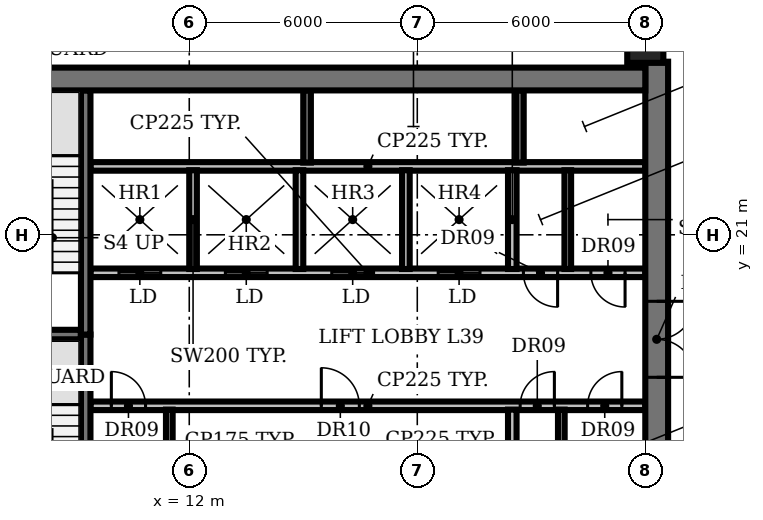
"""IFC4 building model, lengths in metres.
Left out: names, types, materials, properties, quantities, classifications, styles, units other than length and angle.
Written with IfcOpenShell. Run it as: python <this file> out.ifc"""

import sys

from ifc_helpers import new_model, si_unit, direction, frame, frame_2d, origin, origin_2d, place, context, subcontext, project, spatial, rectangle, circle, extrude, element, fill, save


model = new_model("IFC4")
c1 = context("Model", 3, precision=1e-05, world=origin(), true_north=direction((0.0, 1.0)))
c2 = subcontext(c1, "Body", "Model", "MODEL_VIEW")
j1 = project(units=[si_unit("LENGTHUNIT", "METRE"), si_unit("PLANEANGLEUNIT", "RADIAN")], contexts=[c1])
p1 = place(None, origin())
s1 = spatial("IfcSite", under=j1, at=p1, CompositionType="ELEMENT")
p2 = place(p1, origin())
s2 = spatial("IfcBuilding", under=s1, at=p2, CompositionType="ELEMENT")
p3 = place(p2, frame((0.0, 0.0, 176.0)))
s3 = spatial("IfcBuildingStorey", under=s2, at=p3, CompositionType="ELEMENT", Elevation=176.0)
p4 = place(p3, frame((24.0, 26.0, 0.0), z_axis=(0.0, 0.0, 1.0), x_axis=(1.0, 0.0, 0.0)))
e1 = element("IfcColumn", 1, at=p4, inside=s3, PredefinedType="COLUMN", context=c2, shape_type="SweptSolid", body=[
    extrude(circle(Radius=0.475, at=origin_2d()), origin(), (0.0, 0.0, 1.0), 3.85),
])
p5 = place(p3, frame((9.4, 16.5, 0.0), z_axis=(0.0, 0.0, 1.0), x_axis=(1.0, 0.0, 0.0)))
e2 = element("IfcWall", 2, at=p5, inside=s3, PredefinedType="PARTITIONING", context=c2, shape_type="SweptSolid", body=[
    extrude(rectangle(XDim=14.6, YDim=0.225, at=frame_2d((7.3, 0.0))), origin(), (0.0, 0.0, 1.0), 3.85),
])
p6 = place(p5, frame((0.55, 0.0, 0.0)))
e3 = element("IfcOpeningElement", 3, at=p6, cuts=e2, PredefinedType="OPENING", context=c2, shape_type="SweptSolid", body=[
    extrude(rectangle(XDim=0.9, YDim=2.1, at=frame_2d((0.45, 1.05))), frame((0.0, 0.123, 0.0), z_axis=(0.0, -1.0, 0.0), x_axis=(1.0, 0.0, 0.0)), (0.0, 0.0, 1.0), 0.245),
])
p7 = place(p5, frame((6.075, 0.0, 0.0)))
e4 = element("IfcOpeningElement", 4, at=p7, cuts=e2, PredefinedType="OPENING", context=c2, shape_type="SweptSolid", body=[
    extrude(rectangle(XDim=1.0, YDim=2.1, at=frame_2d((0.5, 1.05))), frame((0.0, 0.123, 0.0), z_axis=(0.0, -1.0, 0.0), x_axis=(1.0, 0.0, 0.0)), (0.0, 0.0, 1.0), 0.245),
])
p8 = place(p5, frame((11.308, 0.0, 0.0)))
e5 = element("IfcOpeningElement", 5, at=p8, cuts=e2, PredefinedType="OPENING", context=c2, shape_type="SweptSolid", body=[
    extrude(rectangle(XDim=0.9, YDim=2.1, at=frame_2d((0.45, 1.05))), frame((0.0, 0.123, 0.0), z_axis=(0.0, -1.0, 0.0), x_axis=(1.0, 0.0, 0.0)), (0.0, 0.0, 1.0), 0.245),
])
p9 = place(p5, frame((13.083, 0.0, 0.0)))
e6 = element("IfcOpeningElement", 6, at=p9, cuts=e2, PredefinedType="OPENING", context=c2, shape_type="SweptSolid", body=[
    extrude(rectangle(XDim=0.9, YDim=2.1, at=frame_2d((0.45, 1.05))), frame((0.0, 0.123, 0.0), z_axis=(0.0, -1.0, 0.0), x_axis=(1.0, 0.0, 0.0)), (0.0, 0.0, 1.0), 0.245),
])
p10 = place(p3, frame((6.0, 18.375, 0.0), z_axis=(0.0, 0.0, 1.0), x_axis=(1.0, 0.0, 0.0)))
e7 = element("IfcWall", 7, at=p10, inside=s3, PredefinedType="SHEAR", context=c2, shape_type="SweptSolid", body=[
    extrude(rectangle(XDim=3.15, YDim=0.25, at=frame_2d((1.575, 0.0))), origin(), (0.0, 0.0, 1.0), 3.85),
])
p11 = place(p3, frame((24.0, 20.0, 0.0), z_axis=(0.0, 0.0, 1.0), x_axis=(-1.0, 0.0, 0.0)))
e8 = element("IfcWall", 8, at=p11, inside=s3, PredefinedType="PARTITIONING", context=c2, shape_type="SweptSolid", body=[
    extrude(rectangle(XDim=14.6, YDim=0.225, at=frame_2d((7.3, 0.0))), origin(), (0.0, 0.0, 1.0), 3.85),
])
p12 = place(p11, frame((12.75, 0.0, 0.0)))
e9 = element("IfcOpeningElement", 9, at=p12, cuts=e8, PredefinedType="OPENING", context=c2, shape_type="SweptSolid", body=[
    extrude(rectangle(XDim=1.1, YDim=2.1, at=frame_2d((0.55, 1.05))), frame((0.0, 0.123, 0.0), z_axis=(0.0, -1.0, 0.0), x_axis=(1.0, 0.0, 0.0)), (0.0, 0.0, 1.0), 0.245),
])
p13 = place(p11, frame((9.95, 0.0, 0.0)))
e10 = element("IfcOpeningElement", 10, at=p13, cuts=e8, PredefinedType="OPENING", context=c2, shape_type="SweptSolid", body=[
    extrude(rectangle(XDim=1.1, YDim=2.1, at=frame_2d((0.55, 1.05))), frame((0.0, 0.123, 0.0), z_axis=(0.0, -1.0, 0.0), x_axis=(1.0, 0.0, 0.0)), (0.0, 0.0, 1.0), 0.245),
])
p14 = place(p11, frame((7.15, 0.0, 0.0)))
e11 = element("IfcOpeningElement", 11, at=p14, cuts=e8, PredefinedType="OPENING", context=c2, shape_type="SweptSolid", body=[
    extrude(rectangle(XDim=1.1, YDim=2.1, at=frame_2d((0.55, 1.05))), frame((0.0, 0.123, 0.0), z_axis=(0.0, -1.0, 0.0), x_axis=(1.0, 0.0, 0.0)), (0.0, 0.0, 1.0), 0.245),
])
p15 = place(p11, frame((4.35, 0.0, 0.0)))
e12 = element("IfcOpeningElement", 12, at=p15, cuts=e8, PredefinedType="OPENING", context=c2, shape_type="SweptSolid", body=[
    extrude(rectangle(XDim=1.1, YDim=2.1, at=frame_2d((0.55, 1.05))), frame((0.0, 0.123, 0.0), z_axis=(0.0, -1.0, 0.0), x_axis=(1.0, 0.0, 0.0)), (0.0, 0.0, 1.0), 0.245),
])
p16 = place(p11, frame((2.308, 0.0, 0.0)))
e13 = element("IfcOpeningElement", 13, at=p16, cuts=e8, PredefinedType="OPENING", context=c2, shape_type="SweptSolid", body=[
    extrude(rectangle(XDim=0.9, YDim=2.1, at=frame_2d((0.45, 1.05))), frame((0.0, 0.123, 0.0), z_axis=(0.0, -1.0, 0.0), x_axis=(1.0, 0.0, 0.0)), (0.0, 0.0, 1.0), 0.245),
])
p17 = place(p11, frame((0.532, 0.0, 0.0)))
e14 = element("IfcOpeningElement", 14, at=p17, cuts=e8, PredefinedType="OPENING", context=c2, shape_type="SweptSolid", body=[
    extrude(rectangle(XDim=0.9, YDim=2.1, at=frame_2d((0.45, 1.05))), frame((0.0, 0.123, 0.0), z_axis=(0.0, -1.0, 0.0), x_axis=(1.0, 0.0, 0.0)), (0.0, 0.0, 1.0), 0.245),
])
p18 = place(p3, frame((9.4, 22.8, 0.0), z_axis=(0.0, 0.0, 1.0), x_axis=(1.0, 0.0, 0.0)))
e15 = element("IfcWall", 15, at=p18, inside=s3, PredefinedType="PARTITIONING", context=c2, shape_type="SweptSolid", body=[
    extrude(rectangle(XDim=14.6, YDim=0.225, at=frame_2d((7.3, 0.0))), origin(), (0.0, 0.0, 1.0), 3.85),
])
p19 = place(p3, frame((9.275, 18.375, 0.0), z_axis=(0.0, 0.0, 1.0), x_axis=(0.0, -1.0, 0.0)))
e16 = element("IfcWall", 16, at=p19, inside=s3, PredefinedType="SHEAR", context=c2, shape_type="SweptSolid", body=[
    extrude(rectangle(XDim=6.55, YDim=0.25, at=frame_2d((3.275, 0.0))), origin(), (0.0, 0.0, 1.0), 3.85),
])
p20 = place(p19, frame((5.075, 0.0, 0.0)))
e17 = element("IfcOpeningElement", 17, at=p20, cuts=e16, PredefinedType="OPENING", context=c2, shape_type="SweptSolid", body=[
    extrude(rectangle(XDim=1.0, YDim=2.1, at=frame_2d((0.5, 1.05))), frame((0.0, 0.135, 0.0), z_axis=(0.0, -1.0, 0.0), x_axis=(1.0, 0.0, 0.0)), (0.0, 0.0, 1.0), 0.27),
])
p21 = place(p3, frame((9.275, 18.375, 0.0), z_axis=(0.0, 0.0, 1.0), x_axis=(0.0, 1.0, 0.0)))
e18 = element("IfcWall", 18, at=p21, inside=s3, PredefinedType="SHEAR", context=c2, shape_type="SweptSolid", body=[
    extrude(rectangle(XDim=6.425, YDim=0.25, at=frame_2d((3.212, 0.0))), origin(), (0.0, 0.0, 1.0), 3.85),
])
p22 = place(p3, frame((11.475, 13.8, 0.0), z_axis=(0.0, 0.0, 1.0), x_axis=(0.0, 1.0, 0.0)))
e19 = element("IfcWall", 19, at=p22, inside=s3, PredefinedType="PARTITIONING", context=c2, shape_type="SweptSolid", body=[
    extrude(rectangle(XDim=2.6, YDim=0.175, at=frame_2d((1.3, 0.0))), origin(), (0.0, 0.0, 1.0), 3.85),
])
for number, where, z_axis, x_axis in (
    (20, (12.1, 20.1, 0.0), (0.0, 0.0, 1.0), (0.0, 1.0, 0.0)),
    (21, (14.9, 20.1, 0.0), (0.0, 0.0, 1.0), (0.0, 1.0, 0.0)),
):
    element("IfcWall", number, at=place(p3, frame(where, z_axis=z_axis, x_axis=x_axis)), inside=s3, PredefinedType="SOLIDWALL", context=c2, shape_type="SweptSolid", body=[
        extrude(rectangle(XDim=2.6, YDim=0.2, at=frame_2d((1.3, 0.0))), origin(), (0.0, 0.0, 1.0), 3.85),
    ])
p23 = place(p3, frame((15.1, 22.9, 0.0), z_axis=(0.0, 0.0, 1.0), x_axis=(0.0, 1.0, 0.0)))
e22 = element("IfcWall", 22, at=p23, inside=s3, PredefinedType="SHEAR", context=c2, shape_type="SweptSolid", body=[
    extrude(rectangle(XDim=1.9, YDim=0.2, at=frame_2d((0.95, 0.0))), origin(), (0.0, 0.0, 1.0), 3.85),
])
p24 = place(p3, frame((17.7, 20.1, 0.0), z_axis=(0.0, 0.0, 1.0), x_axis=(0.0, 1.0, 0.0)))
e23 = element("IfcWall", 23, at=p24, inside=s3, PredefinedType="SOLIDWALL", context=c2, shape_type="SweptSolid", body=[
    extrude(rectangle(XDim=2.6, YDim=0.2, at=frame_2d((1.3, 0.0))), origin(), (0.0, 0.0, 1.0), 3.85),
])
for number, where, z_axis, x_axis in (
    (24, (20.5, 13.8, 0.0), (0.0, 0.0, 1.0), (0.0, 1.0, 0.0)),
    (25, (20.5, 20.1, 0.0), (0.0, 0.0, 1.0), (0.0, 1.0, 0.0)),
):
    element("IfcWall", number, at=place(p3, frame(where, z_axis=z_axis, x_axis=x_axis)), inside=s3, PredefinedType="PARTITIONING", context=c2, shape_type="SweptSolid", body=[
        extrude(rectangle(XDim=2.6, YDim=0.225, at=frame_2d((1.3, 0.0))), origin(), (0.0, 0.0, 1.0), 3.85),
    ])
p25 = place(p3, frame((20.7, 22.9, 0.0), z_axis=(0.0, 0.0, 1.0), x_axis=(0.0, 1.0, 0.0)))
e26 = element("IfcWall", 26, at=p25, inside=s3, PredefinedType="SHEAR", context=c2, shape_type="SweptSolid", body=[
    extrude(rectangle(XDim=1.9, YDim=0.2, at=frame_2d((0.95, 0.0))), origin(), (0.0, 0.0, 1.0), 3.85),
])
for number, where, z_axis, x_axis in (
    (27, (21.79, 13.8, 0.0), (0.0, 0.0, 1.0), (0.0, 1.0, 0.0)),
    (28, (21.96, 20.1, 0.0), (0.0, 0.0, 1.0), (0.0, 1.0, 0.0)),
):
    element("IfcWall", number, at=place(p3, frame(where, z_axis=z_axis, x_axis=x_axis)), inside=s3, PredefinedType="PARTITIONING", context=c2, shape_type="SweptSolid", body=[
        extrude(rectangle(XDim=2.6, YDim=0.175, at=frame_2d((1.3, 0.0))), origin(), (0.0, 0.0, 1.0), 3.85),
    ])
p26 = place(p3, frame((24.3, 25.555, 0.0), z_axis=(0.0, 0.0, 1.0), x_axis=(0.0, -1.0, 0.0)))
e29 = element("IfcWall", 29, at=p26, inside=s3, PredefinedType="SHEAR", context=c2, shape_type="SweptSolid", body=[
    extrude(rectangle(XDim=20.755, YDim=0.6, at=frame_2d((10.377, 0.0))), origin(), (0.0, 0.0, 1.0), 3.85),
])
p27 = place(p26, frame((18.405, 0.0, 0.0)))
e30 = element("IfcOpeningElement", 30, at=p27, cuts=e29, PredefinedType="OPENING", context=c2, shape_type="SweptSolid", body=[
    extrude(rectangle(XDim=1.5, YDim=2.1, at=frame_2d((0.75, 1.05))), frame((0.0, 0.31, 0.0), z_axis=(0.0, -1.0, 0.0), x_axis=(1.0, 0.0, 0.0)), (0.0, 0.0, 1.0), 0.62),
])
p28 = place(p26, frame((12.305, 0.0, 0.0)))
e31 = element("IfcOpeningElement", 31, at=p28, cuts=e29, PredefinedType="OPENING", context=c2, shape_type="SweptSolid", body=[
    extrude(rectangle(XDim=0.9, YDim=2.1, at=frame_2d((0.45, 1.05))), frame((0.0, 0.31, 0.0), z_axis=(0.0, -1.0, 0.0), x_axis=(1.0, 0.0, 0.0)), (0.0, 0.0, 1.0), 0.62),
])
p29 = place(p26, frame((6.305, 0.0, 0.0)))
e32 = element("IfcOpeningElement", 32, at=p29, cuts=e29, PredefinedType="OPENING", context=c2, shape_type="SweptSolid", body=[
    extrude(rectangle(XDim=2.0, YDim=2.1, at=frame_2d((1.0, 1.05))), frame((0.0, 0.31, 0.0), z_axis=(0.0, -1.0, 0.0), x_axis=(1.0, 0.0, 0.0)), (0.0, 0.0, 1.0), 0.62),
])
p30 = place(p3, frame((6.0, 25.1, 0.0), z_axis=(0.0, 0.0, 1.0), x_axis=(1.0, 0.0, 0.0)))
e33 = element("IfcWall", 33, at=p30, inside=s3, PredefinedType="SHEAR", context=c2, shape_type="SweptSolid", body=[
    extrude(rectangle(XDim=18.0, YDim=0.6, at=frame_2d((9.0, 0.0))), origin(), (0.0, 0.0, 1.0), 3.85),
])
p31 = place(p6, origin())
e34 = element("IfcDoor", 34, at=p31, inside=s3, OperationType="SINGLE_SWING_LEFT", PredefinedType="DOOR", context=c2, shape_type="SweptSolid", body=[
    extrude(rectangle(XDim=0.9, YDim=2.1, at=frame_2d((0.45, 1.05))), frame((0.0, 0.025, 0.0), z_axis=(0.0, -1.0, 0.0), x_axis=(1.0, 0.0, 0.0)), (0.0, 0.0, 1.0), 0.05),
])
fill(e3, e34)
p32 = place(p7, origin())
e35 = element("IfcDoor", 35, at=p32, inside=s3, OperationType="SINGLE_SWING_LEFT", PredefinedType="DOOR", context=c2, shape_type="SweptSolid", body=[
    extrude(rectangle(XDim=1.0, YDim=2.1, at=frame_2d((0.5, 1.05))), frame((0.0, 0.025, 0.0), z_axis=(0.0, -1.0, 0.0), x_axis=(1.0, 0.0, 0.0)), (0.0, 0.0, 1.0), 0.05),
])
fill(e4, e35)
p33 = place(p8, origin())
e36 = element("IfcDoor", 36, at=p33, inside=s3, OperationType="SINGLE_SWING_RIGHT", PredefinedType="DOOR", context=c2, shape_type="SweptSolid", body=[
    extrude(rectangle(XDim=0.9, YDim=2.1, at=frame_2d((0.45, 1.05))), frame((0.0, 0.025, 0.0), z_axis=(0.0, -1.0, 0.0), x_axis=(1.0, 0.0, 0.0)), (0.0, 0.0, 1.0), 0.05),
])
fill(e5, e36)
p34 = place(p9, origin())
e37 = element("IfcDoor", 37, at=p34, inside=s3, OperationType="SINGLE_SWING_RIGHT", PredefinedType="DOOR", context=c2, shape_type="SweptSolid", body=[
    extrude(rectangle(XDim=0.9, YDim=2.1, at=frame_2d((0.45, 1.05))), frame((0.0, 0.025, 0.0), z_axis=(0.0, -1.0, 0.0), x_axis=(1.0, 0.0, 0.0)), (0.0, 0.0, 1.0), 0.05),
])
fill(e6, e37)
p35 = place(p12, origin())
e38 = element("IfcDoor", 38, at=p35, inside=s3, OperationType="DOUBLE_DOOR_SLIDING", PredefinedType="DOOR", context=c2, shape_type="SweptSolid", body=[
    extrude(rectangle(XDim=1.1, YDim=2.1, at=frame_2d((0.55, 1.05))), frame((0.0, 0.025, 0.0), z_axis=(0.0, -1.0, 0.0), x_axis=(1.0, 0.0, 0.0)), (0.0, 0.0, 1.0), 0.05),
])
fill(e9, e38)
p36 = place(p13, origin())
e39 = element("IfcDoor", 39, at=p36, inside=s3, OperationType="DOUBLE_DOOR_SLIDING", PredefinedType="DOOR", context=c2, shape_type="SweptSolid", body=[
    extrude(rectangle(XDim=1.1, YDim=2.1, at=frame_2d((0.55, 1.05))), frame((0.0, 0.025, 0.0), z_axis=(0.0, -1.0, 0.0), x_axis=(1.0, 0.0, 0.0)), (0.0, 0.0, 1.0), 0.05),
])
fill(e10, e39)
p37 = place(p14, origin())
e40 = element("IfcDoor", 40, at=p37, inside=s3, OperationType="DOUBLE_DOOR_SLIDING", PredefinedType="DOOR", context=c2, shape_type="SweptSolid", body=[
    extrude(rectangle(XDim=1.1, YDim=2.1, at=frame_2d((0.55, 1.05))), frame((0.0, 0.025, 0.0), z_axis=(0.0, -1.0, 0.0), x_axis=(1.0, 0.0, 0.0)), (0.0, 0.0, 1.0), 0.05),
])
fill(e11, e40)
p38 = place(p15, origin())
e41 = element("IfcDoor", 41, at=p38, inside=s3, OperationType="DOUBLE_DOOR_SLIDING", PredefinedType="DOOR", context=c2, shape_type="SweptSolid", body=[
    extrude(rectangle(XDim=1.1, YDim=2.1, at=frame_2d((0.55, 1.05))), frame((0.0, 0.025, 0.0), z_axis=(0.0, -1.0, 0.0), x_axis=(1.0, 0.0, 0.0)), (0.0, 0.0, 1.0), 0.05),
])
fill(e12, e41)
p39 = place(p16, origin())
e42 = element("IfcDoor", 42, at=p39, inside=s3, OperationType="SINGLE_SWING_LEFT", PredefinedType="DOOR", context=c2, shape_type="SweptSolid", body=[
    extrude(rectangle(XDim=0.9, YDim=2.1, at=frame_2d((0.45, 1.05))), frame((0.0, 0.025, 0.0), z_axis=(0.0, -1.0, 0.0), x_axis=(1.0, 0.0, 0.0)), (0.0, 0.0, 1.0), 0.05),
])
fill(e13, e42)
p40 = place(p17, origin())
e43 = element("IfcDoor", 43, at=p40, inside=s3, OperationType="SINGLE_SWING_LEFT", PredefinedType="DOOR", context=c2, shape_type="SweptSolid", body=[
    extrude(rectangle(XDim=0.9, YDim=2.1, at=frame_2d((0.45, 1.05))), frame((0.0, 0.025, 0.0), z_axis=(0.0, -1.0, 0.0), x_axis=(1.0, 0.0, 0.0)), (0.0, 0.0, 1.0), 0.05),
])
fill(e14, e43)
p41 = place(p29, origin())
e44 = element("IfcDoor", 44, at=p41, inside=s3, OperationType="DOUBLE_DOOR_SINGLE_SWING", PredefinedType="DOOR", context=c2, shape_type="SweptSolid", body=[
    extrude(rectangle(XDim=2.0, YDim=2.1, at=frame_2d((1.0, 1.05))), frame((0.0, 0.025, 0.0), z_axis=(0.0, -1.0, 0.0), x_axis=(1.0, 0.0, 0.0)), (0.0, 0.0, 1.0), 0.05),
])
fill(e32, e44)
save(model, sys.argv[1])
